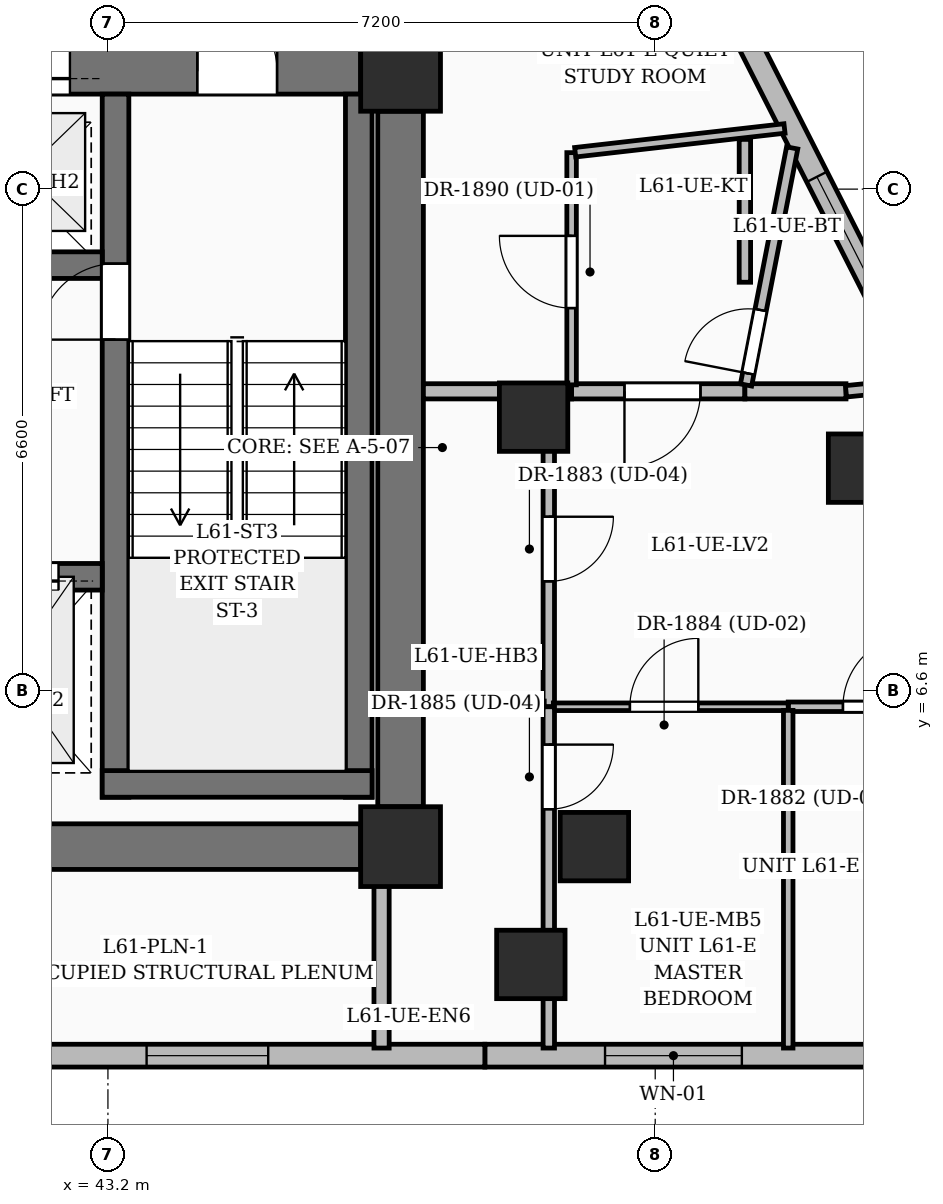
"""IFC4 building model, lengths in metres.
Left out: names, types, materials, properties, quantities, classifications, styles, units other than length and angle.
Written with IfcOpenShell. Run it as: python <this file> out.ifc"""

import sys

from ifc_helpers import new_model, si_unit, direction, frame, frame_2d, origin, origin_2d, place, context, subcontext, project, spatial, rectangle, extrude, element, fill, save


model = new_model("IFC4")
c1 = context("Model", 3, precision=1e-05, world=origin(), true_north=direction((0.0, 1.0)))
c2 = subcontext(c1, "Body", "Model", "MODEL_VIEW")
j1 = project(units=[si_unit("LENGTHUNIT", "METRE"), si_unit("PLANEANGLEUNIT", "RADIAN")], contexts=[c1])
p1 = place(None, origin())
s1 = spatial("IfcSite", under=j1, at=p1, CompositionType="ELEMENT")
p2 = place(p1, origin())
s2 = spatial("IfcBuilding", under=s1, at=p2, CompositionType="ELEMENT")
p3 = place(p2, frame((0.0, 0.0, 237.0)))
s3 = spatial("IfcBuildingStorey", under=s2, at=p3, CompositionType="ELEMENT", Elevation=237.0)
for number, where, z_axis, x_axis in (
    (1, (47.05, 4.55, 0.0), (0.0, 0.0, 1.0), (1.0, 0.0, 0.0)),
    (2, (47.05, 14.75, 0.0), (0.0, 0.0, 1.0), (1.0, 0.0, 0.0)),
):
    element("IfcColumn", number, at=place(p3, frame(where, z_axis=z_axis, x_axis=x_axis)), inside=s3, PredefinedType="COLUMN", context=c2, shape_type="SweptSolid", body=[
        extrude(rectangle(XDim=1.05, YDim=1.05, at=origin_2d()), origin(), (0.0, 0.0, 1.0), 3.75),
    ])
for number, where, z_axis, x_axis in (
    (3, (49.6, 4.55, 0.0), (0.0, 0.0, 1.0), (1.0, 0.0, 0.0)),
    (4, (48.8, 10.2, 0.0), (0.0, 0.0, 1.0), (1.0, 0.0, 0.0)),
):
    element("IfcColumn", number, at=place(p3, frame(where, z_axis=z_axis, x_axis=x_axis)), inside=s3, PredefinedType="COLUMN", context=c2, shape_type="SweptSolid", body=[
        extrude(rectangle(XDim=0.9, YDim=0.9, at=origin_2d()), origin(), (0.0, 0.0, 1.0), 3.75),
    ])
p4 = place(p3, frame((35.675, 4.55, 0.0), z_axis=(0.0, 0.0, 1.0), x_axis=(1.0, 0.0, 0.0)))
e5 = element("IfcWall", 5, at=p4, inside=s3, PredefinedType="SHEAR", context=c2, shape_type="SweptSolid", body=[
    extrude(rectangle(XDim=10.85, YDim=0.6, at=frame_2d((5.425, 0.0))), origin(), (0.0, 0.0, 1.0), 3.75),
])
p5 = place(p3, frame((35.675, 14.75, 0.0), z_axis=(0.0, 0.0, 1.0), x_axis=(1.0, 0.0, 0.0)))
e6 = element("IfcWall", 6, at=p5, inside=s3, PredefinedType="SHEAR", context=c2, shape_type="SweptSolid", body=[
    extrude(rectangle(XDim=10.85, YDim=0.6, at=frame_2d((5.425, 0.0))), origin(), (0.0, 0.0, 1.0), 3.75),
])
p6 = place(p5, frame((1.1, 0.0, 0.0)))
e7 = element("IfcOpeningElement", 7, at=p6, cuts=e6, PredefinedType="OPENING", context=c2, shape_type="SweptSolid", body=[
    extrude(rectangle(XDim=1.05, YDim=2.15, at=frame_2d((0.525, 1.075))), frame((0.0, 0.31, 0.0), z_axis=(0.0, -1.0, 0.0), x_axis=(1.0, 0.0, 0.0)), (0.0, 0.0, 1.0), 0.62),
])
p7 = place(p5, frame((8.7, 0.0, 0.0)))
e8 = element("IfcOpeningElement", 8, at=p7, cuts=e6, PredefinedType="OPENING", context=c2, shape_type="SweptSolid", body=[
    extrude(rectangle(XDim=1.05, YDim=2.15, at=frame_2d((0.525, 1.075))), frame((0.0, 0.31, 0.0), z_axis=(0.0, -1.0, 0.0), x_axis=(1.0, 0.0, 0.0)), (0.0, 0.0, 1.0), 0.62),
])
p8 = place(p5, frame((3.825, 0.0, 0.0)))
e9 = element("IfcOpeningElement", 9, at=p8, cuts=e6, PredefinedType="OPENING", context=c2, shape_type="SweptSolid", body=[
    extrude(rectangle(XDim=1.2, YDim=2.2, at=frame_2d((0.6, 1.1))), frame((0.0, 0.31, 0.0), z_axis=(0.0, -1.0, 0.0), x_axis=(1.0, 0.0, 0.0)), (0.0, 0.0, 1.0), 0.62),
])
p9 = place(p5, frame((5.825, 0.0, 0.0)))
e10 = element("IfcOpeningElement", 10, at=p9, cuts=e6, PredefinedType="OPENING", context=c2, shape_type="SweptSolid", body=[
    extrude(rectangle(XDim=1.2, YDim=2.2, at=frame_2d((0.6, 1.1))), frame((0.0, 0.31, 0.0), z_axis=(0.0, -1.0, 0.0), x_axis=(1.0, 0.0, 0.0)), (0.0, 0.0, 1.0), 0.62),
])
p10 = place(p3, frame((47.05, 5.075, 0.0), z_axis=(0.0, 0.0, 1.0), x_axis=(0.0, 1.0, 0.0)))
e11 = element("IfcWall", 11, at=p10, inside=s3, PredefinedType="SHEAR", context=c2, shape_type="SweptSolid", body=[
    extrude(rectangle(XDim=9.15, YDim=0.6, at=frame_2d((4.575, 0.0))), origin(), (0.0, 0.0, 1.0), 3.75),
])
p11 = place(p3, frame((43.3, 5.2, 0.0), z_axis=(0.0, 0.0, 1.0), x_axis=(0.0, 1.0, 0.0)))
e12 = element("IfcWall", 12, at=p11, inside=s3, PredefinedType="SOLIDWALL", context=c2, shape_type="SweptSolid", body=[
    extrude(rectangle(XDim=9.25, YDim=0.35, at=frame_2d((4.625, 0.0))), origin(), (0.0, 0.0, 1.0), 3.75),
])
p12 = place(p11, frame((6.02, 0.0, 0.0)))
e13 = element("IfcOpeningElement", 13, at=p12, cuts=e12, PredefinedType="OPENING", context=c2, shape_type="SweptSolid", body=[
    extrude(rectangle(XDim=1.0, YDim=2.15, at=frame_2d((0.5, 1.075))), frame((0.0, 0.185, 0.0), z_axis=(0.0, -1.0, 0.0), x_axis=(1.0, 0.0, 0.0)), (0.0, 0.0, 1.0), 0.37),
])
p13 = place(p3, frame((46.5, 5.2, 0.0), z_axis=(0.0, 0.0, 1.0), x_axis=(0.0, 1.0, 0.0)))
e14 = element("IfcWall", 14, at=p13, inside=s3, PredefinedType="SOLIDWALL", context=c2, shape_type="SweptSolid", body=[
    extrude(rectangle(XDim=9.25, YDim=0.35, at=frame_2d((4.625, 0.0))), origin(), (0.0, 0.0, 1.0), 3.75),
])
p14 = place(p3, frame((43.125, 5.375, 0.0), z_axis=(0.0, 0.0, 1.0), x_axis=(1.0, 0.0, 0.0)))
e15 = element("IfcWall", 15, at=p14, inside=s3, PredefinedType="SOLIDWALL", context=c2, shape_type="SweptSolid", body=[
    extrude(rectangle(XDim=3.55, YDim=0.35, at=frame_2d((1.775, 0.0))), origin(), (0.0, 0.0, 1.0), 3.75),
])
p15 = place(p3, frame((40.55, 8.1, 0.0), z_axis=(0.0, 0.0, 1.0), x_axis=(1.0, 0.0, 0.0)))
e16 = element("IfcWall", 16, at=p15, inside=s3, PredefinedType="SOLIDWALL", context=c2, shape_type="SweptSolid", body=[
    extrude(rectangle(XDim=2.575, YDim=0.35, at=frame_2d((1.288, 0.0))), origin(), (0.0, 0.0, 1.0), 3.75),
])
p16 = place(p15, frame((0.7, 0.0, 0.0)))
e17 = element("IfcOpeningElement", 17, at=p16, cuts=e16, PredefinedType="OPENING", context=c2, shape_type="SweptSolid", body=[
    extrude(rectangle(XDim=1.3, YDim=2.25, at=frame_2d((0.65, 1.125))), frame((0.0, 0.185, 0.0), z_axis=(0.0, -1.0, 0.0), x_axis=(1.0, 0.0, 0.0)), (0.0, 0.0, 1.0), 0.37),
])
p17 = place(p3, frame((39.075, 12.2, 0.0), z_axis=(0.0, 0.0, 1.0), x_axis=(1.0, 0.0, 0.0)))
e18 = element("IfcWall", 18, at=p17, inside=s3, PredefinedType="SOLIDWALL", context=c2, shape_type="SweptSolid", body=[
    extrude(rectangle(XDim=4.05, YDim=0.35, at=frame_2d((2.025, 0.0))), origin(), (0.0, 0.0, 1.0), 3.75),
])
for number, where, z_axis, x_axis in (
    (19, (48.764, 3.0, 0.0), (0.0, 0.0, 1.0), (1.0, 0.0, 0.0)),
    (20, (53.128, 9.529, 0.0), (0.0, 0.0, 1.0), (1.0, 0.0, 0.0)),
):
    element("IfcColumn", number, at=place(p3, frame(where, z_axis=z_axis, x_axis=x_axis)), inside=s3, PredefinedType="COLUMN", context=c2, shape_type="SweptSolid", body=[
        extrude(rectangle(XDim=0.9, YDim=0.9, at=origin_2d()), origin(), (0.0, 0.0, 1.0), 3.75),
    ])
p18 = place(p3, frame((51.01, 16.349, 0.0), z_axis=(0.0, 0.0, 1.0), x_axis=(0.452847757291, -0.891587858103, 0.0)))
e21 = element("IfcWall", 21, at=p18, inside=s3, PredefinedType="SOLIDWALL", context=c2, shape_type="SweptSolid", body=[
    extrude(rectangle(XDim=6.092, YDim=0.3, at=frame_2d((3.046, 0.0))), origin(), (0.0, 0.0, 1.0), 3.5),
])
p19 = place(p18, frame((3.35, 0.0, 0.6)))
e22 = element("IfcOpeningElement", 22, at=p19, cuts=e21, PredefinedType="OPENING", context=c2, shape_type="SweptSolid", body=[
    extrude(rectangle(XDim=1.8, YDim=2.1, at=frame_2d((0.9, 1.05))), frame((0.0, 0.16, 0.0), z_axis=(0.0, -1.0, 0.0), x_axis=(1.0, 0.0, 0.0)), (0.0, 0.0, 1.0), 0.32),
])
p20 = place(p3, frame((53.975, 1.8, 0.0), z_axis=(0.0, 0.0, 1.0), x_axis=(-1.0, 0.0, 0.0)))
e23 = element("IfcWall", 23, at=p20, inside=s3, PredefinedType="SOLIDWALL", context=c2, shape_type="SweptSolid", body=[
    extrude(rectangle(XDim=5.816, YDim=0.3, at=frame_2d((2.908, 0.0))), origin(), (0.0, 0.0, 1.0), 3.5),
])
p21 = place(p20, frame((2.435, 0.0, 0.6)))
e24 = element("IfcOpeningElement", 24, at=p21, cuts=e23, PredefinedType="OPENING", context=c2, shape_type="SweptSolid", body=[
    extrude(rectangle(XDim=1.8, YDim=2.1, at=frame_2d((0.9, 1.05))), frame((0.0, 0.16, 0.0), z_axis=(0.0, -1.0, 0.0), x_axis=(1.0, 0.0, 0.0)), (0.0, 0.0, 1.0), 0.32),
])
p22 = place(p3, frame((48.159, 1.8, 0.0), z_axis=(0.0, 0.0, 1.0), x_axis=(-1.0, 0.0, 0.0)))
e25 = element("IfcWall", 25, at=p22, inside=s3, PredefinedType="SOLIDWALL", context=c2, shape_type="SweptSolid", body=[
    extrude(rectangle(XDim=6.381, YDim=0.3, at=frame_2d((3.191, 0.0))), origin(), (0.0, 0.0, 1.0), 3.5),
])
p23 = place(p22, frame((2.85, 0.0, 0.55)))
e26 = element("IfcOpeningElement", 26, at=p23, cuts=e25, PredefinedType="OPENING", context=c2, shape_type="SweptSolid", body=[
    extrude(rectangle(XDim=1.6, YDim=2.2, at=frame_2d((0.8, 1.1))), frame((0.0, 0.16, 0.0), z_axis=(0.0, -1.0, 0.0), x_axis=(1.0, 0.0, 0.0)), (0.0, 0.0, 1.0), 0.32),
])
p24 = place(p3, frame((46.8, 1.9, 0.0), z_axis=(0.0, 0.0, 1.0), x_axis=(0.0, 1.0, 0.0)))
e27 = element("IfcWall", 27, at=p24, inside=s3, PredefinedType="PARTITIONING", context=c2, shape_type="SweptSolid", body=[
    extrude(rectangle(XDim=2.35, YDim=0.2, at=frame_2d((1.175, 0.0))), origin(), (0.0, 0.0, 1.0), 2.82),
])
p25 = place(p3, frame((49.0, 10.54, 0.0), z_axis=(0.0, 0.0, 1.0), x_axis=(0.0, -1.0, 0.0)))
e28 = element("IfcWall", 28, at=p25, inside=s3, PredefinedType="PARTITIONING", context=c2, shape_type="SweptSolid", body=[
    extrude(rectangle(XDim=4.15, YDim=0.15, at=frame_2d((2.075, 0.0))), origin(), (0.0, 0.0, 1.0), 3.5),
])
p26 = place(p25, frame((1.65, 0.0, 0.0)))
e29 = element("IfcOpeningElement", 29, at=p26, cuts=e28, PredefinedType="OPENING", context=c2, shape_type="SweptSolid", body=[
    extrude(rectangle(XDim=0.85, YDim=2.1, at=frame_2d((0.425, 1.05))), frame((0.0, 0.085, 0.0), z_axis=(0.0, -1.0, 0.0), x_axis=(1.0, 0.0, 0.0)), (0.0, 0.0, 1.0), 0.17),
])
p27 = place(p3, frame((52.15, 6.39, 0.0), z_axis=(0.0, 0.0, 1.0), x_axis=(1.0, 0.0, 0.0)))
e30 = element("IfcWall", 30, at=p27, inside=s3, PredefinedType="PARTITIONING", context=c2, shape_type="SweptSolid", body=[
    extrude(rectangle(XDim=2.39, YDim=0.125, at=frame_2d((1.195, 0.0))), origin(), (0.0, 0.0, 1.0), 3.5),
])
p28 = place(p27, frame((0.72, 0.0, 0.0)))
e31 = element("IfcOpeningElement", 31, at=p28, cuts=e30, PredefinedType="OPENING", context=c2, shape_type="SweptSolid", body=[
    extrude(rectangle(XDim=0.95, YDim=2.2, at=frame_2d((0.475, 1.1))), frame((0.0, 0.072, 0.0), z_axis=(0.0, -1.0, 0.0), x_axis=(1.0, 0.0, 0.0)), (0.0, 0.0, 1.0), 0.145),
])
p29 = place(p3, frame((49.06, 6.39, 0.0), z_axis=(0.0, 0.0, 1.0), x_axis=(1.0, 0.0, 0.0)))
e32 = element("IfcWall", 32, at=p29, inside=s3, PredefinedType="PARTITIONING", context=c2, shape_type="SweptSolid", body=[
    extrude(rectangle(XDim=3.09, YDim=0.1, at=frame_2d((1.545, 0.0))), origin(), (0.0, 0.0, 1.0), 2.82),
])
p30 = place(p29, frame((1.007, 0.0, 0.0)))
e33 = element("IfcOpeningElement", 33, at=p30, cuts=e32, PredefinedType="OPENING", context=c2, shape_type="SweptSolid", body=[
    extrude(rectangle(XDim=0.9, YDim=2.15, at=frame_2d((0.45, 1.075))), frame((0.0, 0.06, 0.0), z_axis=(0.0, -1.0, 0.0), x_axis=(1.0, 0.0, 0.0)), (0.0, 0.0, 1.0), 0.12),
])
p31 = place(p3, frame((49.3, 10.54, 0.0), z_axis=(0.0, 0.0, 1.0), x_axis=(-1.0, 0.0, 0.0)))
e34 = element("IfcWall", 34, at=p31, inside=s3, PredefinedType="PARTITIONING", context=c2, shape_type="SweptSolid", body=[
    extrude(rectangle(XDim=0.3, YDim=0.2, at=frame_2d((0.15, 0.0))), origin(), (0.0, 0.0, 1.0), 3.5),
])
p32 = place(p3, frame((51.58, 10.54, 0.0), z_axis=(0.0, 0.0, 1.0), x_axis=(-1.0, 0.0, 0.0)))
e35 = element("IfcWall", 35, at=p32, inside=s3, PredefinedType="PARTITIONING", context=c2, shape_type="SweptSolid", body=[
    extrude(rectangle(XDim=2.28, YDim=0.2, at=frame_2d((1.14, 0.0))), origin(), (0.0, 0.0, 1.0), 3.16),
])
p33 = place(p32, frame((0.584, 0.0, 0.0)))
e36 = element("IfcOpeningElement", 36, at=p33, cuts=e35, PredefinedType="OPENING", context=c2, shape_type="SweptSolid", body=[
    extrude(rectangle(XDim=1.0, YDim=2.2, at=frame_2d((0.5, 1.1))), frame((0.0, 0.11, 0.0), z_axis=(0.0, -1.0, 0.0), x_axis=(1.0, 0.0, 0.0)), (0.0, 0.0, 1.0), 0.22),
])
p34 = place(p3, frame((52.91, 10.54, 0.0), z_axis=(0.0, 0.0, 1.0), x_axis=(-1.0, 0.0, 0.0)))
e37 = element("IfcWall", 37, at=p34, inside=s3, PredefinedType="PARTITIONING", context=c2, shape_type="SweptSolid", body=[
    extrude(rectangle(XDim=1.33, YDim=0.2, at=frame_2d((0.665, 0.0))), origin(), (0.0, 0.0, 1.0), 2.82),
])
p35 = place(p3, frame((47.35, 6.39, 0.0), z_axis=(0.0, 0.0, 1.0), x_axis=(1.0, 0.0, 0.0)))
e38 = element("IfcWall", 38, at=p35, inside=s3, PredefinedType="PARTITIONING", context=c2, shape_type="SweptSolid", body=[
    extrude(rectangle(XDim=1.59, YDim=0.15, at=frame_2d((0.795, 0.0))), origin(), (0.0, 0.0, 1.0), 2.685),
])
p36 = place(p3, frame((48.94, 10.54, 0.0), z_axis=(0.0, 0.0, 1.0), x_axis=(-1.0, 0.0, 0.0)))
e39 = element("IfcWall", 39, at=p36, inside=s3, PredefinedType="PARTITIONING", context=c2, shape_type="SweptSolid", body=[
    extrude(rectangle(XDim=1.59, YDim=0.2, at=frame_2d((0.795, 0.0))), origin(), (0.0, 0.0, 1.0), 3.5),
])
p37 = place(p3, frame((52.15, 6.343, 0.0), z_axis=(0.0, 0.0, 1.0), x_axis=(0.0, -1.0, 0.0)))
e40 = element("IfcWall", 40, at=p37, inside=s3, PredefinedType="PARTITIONING", context=c2, shape_type="SweptSolid", body=[
    extrude(rectangle(XDim=4.443, YDim=0.125, at=frame_2d((2.221, 0.0))), origin(), (0.0, 0.0, 1.0), 3.5),
])
p38 = place(p3, frame((49.0, 6.39, 0.0), z_axis=(0.0, 0.0, 1.0), x_axis=(0.0, -1.0, 0.0)))
e41 = element("IfcWall", 41, at=p38, inside=s3, PredefinedType="PARTITIONING", context=c2, shape_type="SweptSolid", body=[
    extrude(rectangle(XDim=4.49, YDim=0.15, at=frame_2d((2.245, 0.0))), origin(), (0.0, 0.0, 1.0), 2.685),
])
p39 = place(p38, frame((0.498, 0.0, 0.0)))
e42 = element("IfcOpeningElement", 42, at=p39, cuts=e41, PredefinedType="OPENING", context=c2, shape_type="SweptSolid", body=[
    extrude(rectangle(XDim=0.85, YDim=2.1, at=frame_2d((0.425, 1.05))), frame((0.0, 0.085, 0.0), z_axis=(0.0, -1.0, 0.0), x_axis=(1.0, 0.0, 0.0)), (0.0, 0.0, 1.0), 0.17),
])
p40 = place(p3, frame((49.3, 10.625, 0.0), z_axis=(0.0, 0.0, 1.0), x_axis=(0.0, 1.0, 0.0)))
e43 = element("IfcWall", 43, at=p40, inside=s3, PredefinedType="PARTITIONING", context=c2, shape_type="SweptSolid", body=[
    extrude(rectangle(XDim=3.055, YDim=0.125, at=frame_2d((1.527, 0.0))), origin(), (0.0, 0.0, 1.0), 3.16),
])
p41 = place(p40, frame((1.01, 0.0, 0.0)))
e44 = element("IfcOpeningElement", 44, at=p41, cuts=e43, PredefinedType="OPENING", context=c2, shape_type="SweptSolid", body=[
    extrude(rectangle(XDim=0.95, YDim=2.2, at=frame_2d((0.475, 1.1))), frame((0.0, 0.072, 0.0), z_axis=(0.0, -1.0, 0.0), x_axis=(1.0, 0.0, 0.0)), (0.0, 0.0, 1.0), 0.145),
])
p42 = place(p3, frame((49.347, 13.685, 0.0), z_axis=(0.0, 0.0, 1.0), x_axis=(0.993613337674, 0.112838535954, 0.0)))
e45 = element("IfcWall", 45, at=p42, inside=s3, PredefinedType="PARTITIONING", context=c2, shape_type="SweptSolid", body=[
    extrude(rectangle(XDim=2.772, YDim=0.125, at=frame_2d((1.386, 0.0))), origin(), (0.0, 0.0, 1.0), 2.82),
])
p43 = place(p3, frame((51.595, 10.624, 0.0), z_axis=(0.0, 0.0, 1.0), x_axis=(0.190970447777, 0.981595786501, 0.0)))
e46 = element("IfcWall", 46, at=p43, inside=s3, PredefinedType="PARTITIONING", context=c2, shape_type="SweptSolid", body=[
    extrude(rectangle(XDim=3.177, YDim=0.15, at=frame_2d((1.588, 0.0))), origin(), (0.0, 0.0, 1.0), 2.82),
])
p44 = place(p43, frame((0.154, 0.0, 0.0)))
e47 = element("IfcOpeningElement", 47, at=p44, cuts=e46, PredefinedType="OPENING", context=c2, shape_type="SweptSolid", body=[
    extrude(rectangle(XDim=0.85, YDim=2.1, at=frame_2d((0.425, 1.05))), frame((0.0, 0.085, 0.0), z_axis=(0.0, -1.0, 0.0), x_axis=(1.0, 0.0, 0.0)), (0.0, 0.0, 1.0), 0.17),
])
p45 = place(p3, frame((52.91, 10.54, 0.0), z_axis=(0.0, 0.0, 1.0), x_axis=(0.994977766191, 0.100096177681, 0.0)))
e48 = element("IfcWall", 48, at=p45, inside=s3, PredefinedType="PARTITIONING", context=c2, shape_type="SweptSolid", body=[
    extrude(rectangle(XDim=0.897, YDim=0.15, at=frame_2d((0.449, 0.0))), origin(), (0.0, 0.0, 1.0), 3.5),
])
p46 = place(p3, frame((51.58, 11.975, 0.0), z_axis=(0.0, 0.0, 1.0), x_axis=(0.0, 1.0, 0.0)))
e49 = element("IfcWall", 49, at=p46, inside=s3, PredefinedType="PARTITIONING", context=c2, shape_type="SweptSolid", body=[
    extrude(rectangle(XDim=1.88, YDim=0.15, at=frame_2d((0.94, 0.0))), origin(), (0.0, 0.0, 1.0), 3.5),
])
p47 = place(p19, origin())
e50 = element("IfcWindow", 50, at=p47, inside=s3, PartitioningType="SINGLE_PANEL", PredefinedType="WINDOW", context=c2, shape_type="SweptSolid", body=[
    extrude(rectangle(XDim=1.8, YDim=2.1, at=frame_2d((0.9, 1.05))), frame((0.0, 0.03, 0.0), z_axis=(0.0, -1.0, 0.0), x_axis=(1.0, 0.0, 0.0)), (0.0, 0.0, 1.0), 0.06),
])
fill(e22, e50)
p48 = place(p21, origin())
e51 = element("IfcWindow", 51, at=p48, inside=s3, PartitioningType="SINGLE_PANEL", PredefinedType="WINDOW", context=c2, shape_type="SweptSolid", body=[
    extrude(rectangle(XDim=1.8, YDim=2.1, at=frame_2d((0.9, 1.05))), frame((0.0, 0.03, 0.0), z_axis=(0.0, -1.0, 0.0), x_axis=(1.0, 0.0, 0.0)), (0.0, 0.0, 1.0), 0.06),
])
fill(e24, e51)
p49 = place(p23, origin())
e52 = element("IfcWindow", 52, at=p49, inside=s3, PartitioningType="SINGLE_PANEL", PredefinedType="WINDOW", context=c2, shape_type="SweptSolid", body=[
    extrude(rectangle(XDim=1.6, YDim=2.2, at=frame_2d((0.8, 1.1))), frame((0.0, 0.03, 0.0), z_axis=(0.0, -1.0, 0.0), x_axis=(1.0, 0.0, 0.0)), (0.0, 0.0, 1.0), 0.06),
])
fill(e26, e52)
p50 = place(p7, origin())
e53 = element("IfcDoor", 53, at=p50, inside=s3, OperationType="SINGLE_SWING_LEFT", PredefinedType="DOOR", context=c2, shape_type="SweptSolid", body=[
    extrude(rectangle(XDim=1.05, YDim=2.15, at=frame_2d((0.525, 1.075))), frame((0.0, 0.025, 0.0), z_axis=(0.0, -1.0, 0.0), x_axis=(1.0, 0.0, 0.0)), (0.0, 0.0, 1.0), 0.05),
])
fill(e8, e53)
p51 = place(p12, origin())
e54 = element("IfcDoor", 54, at=p51, inside=s3, OperationType="SINGLE_SWING_LEFT", PredefinedType="DOOR", context=c2, shape_type="SweptSolid", body=[
    extrude(rectangle(XDim=1.0, YDim=2.15, at=frame_2d((0.5, 1.075))), frame((0.0, 0.025, 0.0), z_axis=(0.0, -1.0, 0.0), x_axis=(1.0, 0.0, 0.0)), (0.0, 0.0, 1.0), 0.05),
])
fill(e13, e54)
p52 = place(p16, origin())
e55 = element("IfcDoor", 55, at=p52, inside=s3, OperationType="DOUBLE_DOOR_SLIDING", PredefinedType="DOOR", context=c2, shape_type="SweptSolid", body=[
    extrude(rectangle(XDim=1.3, YDim=2.25, at=frame_2d((0.65, 1.125))), frame((0.0, 0.025, 0.0), z_axis=(0.0, -1.0, 0.0), x_axis=(1.0, 0.0, 0.0)), (0.0, 0.0, 1.0), 0.05),
])
fill(e17, e55)
p53 = place(p9, origin())
e56 = element("IfcDoor", 56, at=p53, inside=s3, OperationType="DOUBLE_DOOR_SLIDING", PredefinedType="DOOR", context=c2, shape_type="SweptSolid", body=[
    extrude(rectangle(XDim=1.2, YDim=2.2, at=frame_2d((0.6, 1.1))), frame((0.0, 0.025, 0.0), z_axis=(0.0, -1.0, 0.0), x_axis=(1.0, 0.0, 0.0)), (0.0, 0.0, 1.0), 0.05),
])
fill(e10, e56)
p54 = place(p28, origin())
e57 = element("IfcDoor", 57, at=p54, inside=s3, OperationType="SINGLE_SWING_RIGHT", PredefinedType="DOOR", context=c2, shape_type="SweptSolid", body=[
    extrude(rectangle(XDim=0.95, YDim=2.2, at=frame_2d((0.475, 1.1))), frame((0.0, 0.025, 0.0), z_axis=(0.0, -1.0, 0.0), x_axis=(1.0, 0.0, 0.0)), (0.0, 0.0, 1.0), 0.05),
])
fill(e31, e57)
p55 = place(p26, origin())
e58 = element("IfcDoor", 58, at=p55, inside=s3, OperationType="SINGLE_SWING_LEFT", PredefinedType="DOOR", context=c2, shape_type="SweptSolid", body=[
    extrude(rectangle(XDim=0.85, YDim=2.1, at=frame_2d((0.425, 1.05))), frame((0.0, 0.025, 0.0), z_axis=(0.0, -1.0, 0.0), x_axis=(1.0, 0.0, 0.0)), (0.0, 0.0, 1.0), 0.05),
])
fill(e29, e58)
p56 = place(p30, origin())
e59 = element("IfcDoor", 59, at=p56, inside=s3, OperationType="SINGLE_SWING_RIGHT", PredefinedType="DOOR", context=c2, shape_type="SweptSolid", body=[
    extrude(rectangle(XDim=0.9, YDim=2.15, at=frame_2d((0.45, 1.075))), frame((0.0, 0.025, 0.0), z_axis=(0.0, -1.0, 0.0), x_axis=(1.0, 0.0, 0.0)), (0.0, 0.0, 1.0), 0.05),
])
fill(e33, e59)
p57 = place(p39, origin())
e60 = element("IfcDoor", 60, at=p57, inside=s3, OperationType="SINGLE_SWING_LEFT", PredefinedType="DOOR", context=c2, shape_type="SweptSolid", body=[
    extrude(rectangle(XDim=0.85, YDim=2.1, at=frame_2d((0.425, 1.05))), frame((0.0, 0.025, 0.0), z_axis=(0.0, -1.0, 0.0), x_axis=(1.0, 0.0, 0.0)), (0.0, 0.0, 1.0), 0.05),
])
fill(e42, e60)
p58 = place(p41, origin())
e61 = element("IfcDoor", 61, at=p58, inside=s3, OperationType="SINGLE_SWING_RIGHT", PredefinedType="DOOR", context=c2, shape_type="SweptSolid", body=[
    extrude(rectangle(XDim=0.95, YDim=2.2, at=frame_2d((0.475, 1.1))), frame((0.0, 0.025, 0.0), z_axis=(0.0, -1.0, 0.0), x_axis=(1.0, 0.0, 0.0)), (0.0, 0.0, 1.0), 0.05),
])
fill(e44, e61)
p59 = place(p44, origin())
e62 = element("IfcDoor", 62, at=p59, inside=s3, OperationType="SINGLE_SWING_LEFT", PredefinedType="DOOR", context=c2, shape_type="SweptSolid", body=[
    extrude(rectangle(XDim=0.85, YDim=2.1, at=frame_2d((0.425, 1.05))), frame((0.0, 0.025, 0.0), z_axis=(0.0, -1.0, 0.0), x_axis=(1.0, 0.0, 0.0)), (0.0, 0.0, 1.0), 0.05),
])
fill(e47, e62)
p60 = place(p33, origin())
e63 = element("IfcDoor", 63, at=p60, inside=s3, OperationType="SINGLE_SWING_RIGHT", PredefinedType="DOOR", context=c2, shape_type="SweptSolid", body=[
    extrude(rectangle(XDim=1.0, YDim=2.2, at=frame_2d((0.5, 1.1))), frame((0.0, 0.025, 0.0), z_axis=(0.0, -1.0, 0.0), x_axis=(1.0, 0.0, 0.0)), (0.0, 0.0, 1.0), 0.05),
])
fill(e36, e63)
save(model, sys.argv[1])
